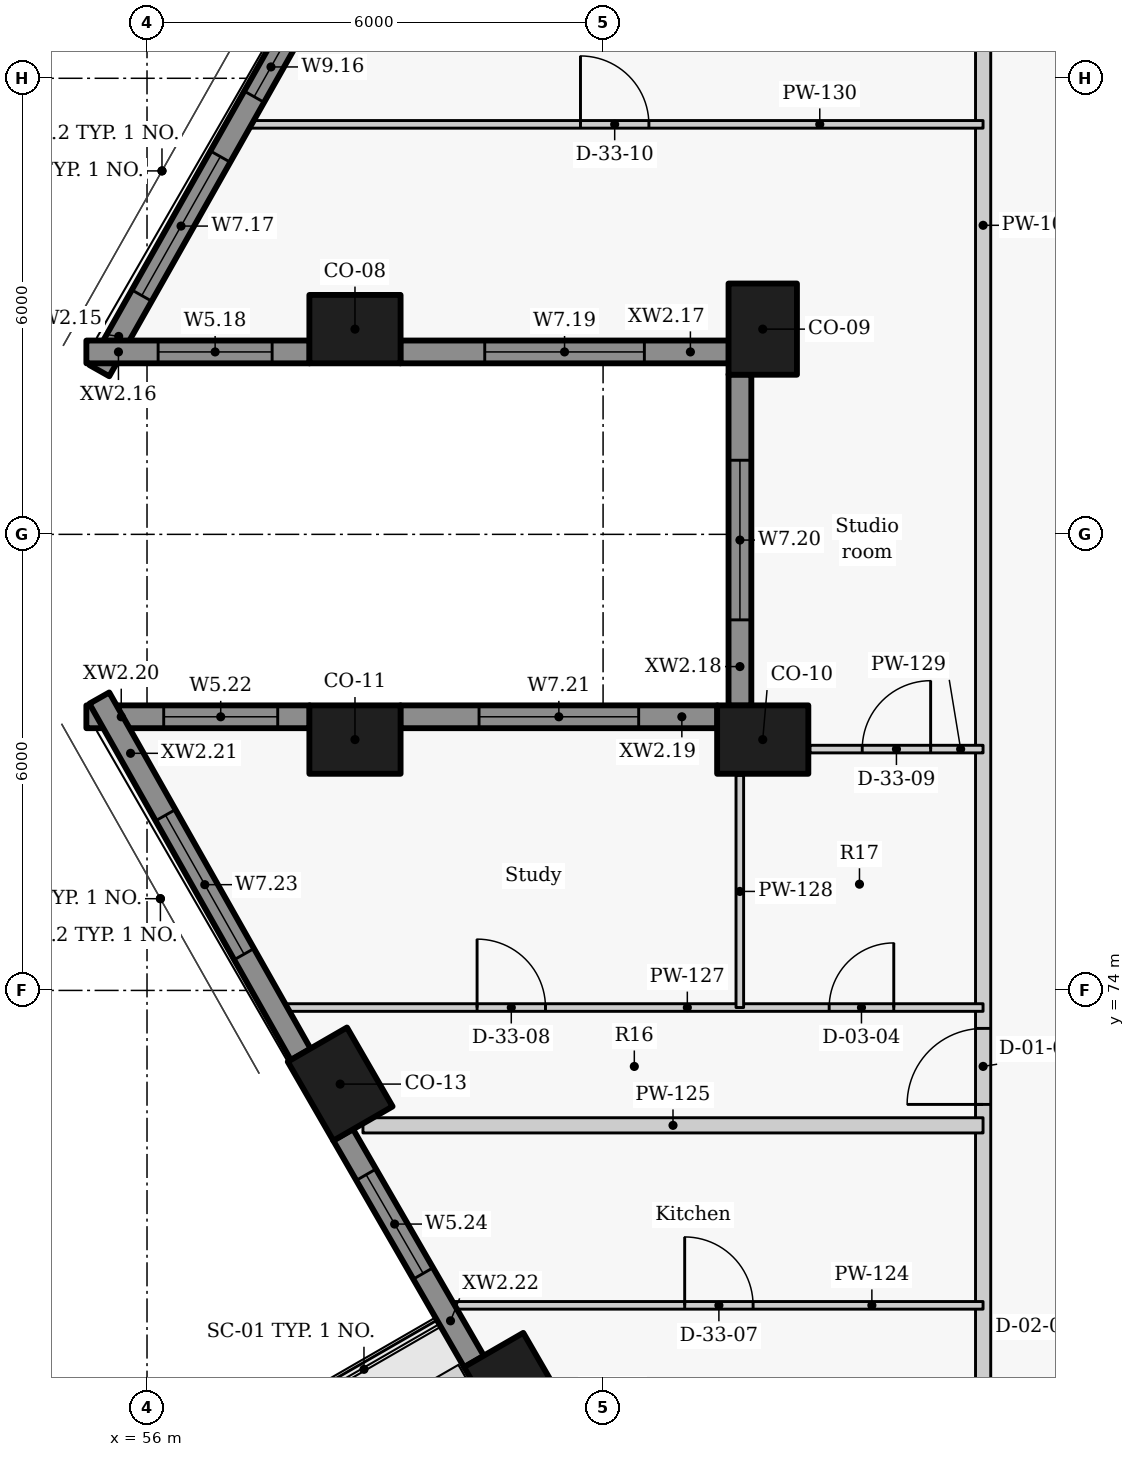
"""IFC4 building model, lengths in metres.
Left out: names, types, materials, properties, quantities, classifications, styles, units other than length and angle.
Written with IfcOpenShell. Run it as: python <this file> out.ifc"""

import sys

from ifc_helpers import new_model, si_unit, direction, frame, frame_2d, origin, origin_2d, place, context, subcontext, project, spatial, rectangle, extrude, element, fill, save


model = new_model("IFC4")
c1 = context("Model", 3, precision=1e-05, world=origin(), true_north=direction((0.0, 1.0)))
c2 = subcontext(c1, "Body", "Model", "MODEL_VIEW")
j1 = project(units=[si_unit("LENGTHUNIT", "METRE"), si_unit("PLANEANGLEUNIT", "RADIAN")], contexts=[c1])
p1 = place(None, origin())
s1 = spatial("IfcSite", under=j1, at=p1, CompositionType="ELEMENT")
p2 = place(p1, origin())
s2 = spatial("IfcBuilding", under=s1, at=p2, CompositionType="ELEMENT")
p3 = place(p2, frame((0.0, 0.0, 183.3)))
s3 = spatial("IfcBuildingStorey", under=s2, at=p3, CompositionType="ELEMENT", Elevation=183.3)
for number, where, z_axis, x_axis in (
    (1, (58.736, 82.7, 0.0), (0.0, 0.0, 1.0), (1.0, 0.0, 0.0)),
    (2, (64.101, 82.7, 0.0), (0.0, 0.0, 1.0), (0.0, -1.0, 0.0)),
    (3, (64.101, 77.3, 0.0), (0.0, 0.0, 1.0), (-1.0, 0.0, 0.0)),
    (4, (58.736, 77.3, 0.0), (0.0, 0.0, 1.0), (-1.0, 0.0, 0.0)),
    (5, (58.541, 72.768, 0.0), (0.0, 0.0, 1.0), (0.5, -0.866, 0.0)),
    (6, (60.861, 68.75, 0.0), (0.0, 0.0, 1.0), (0.5, -0.866, 0.0)),
):
    element("IfcColumn", number, at=place(p3, frame(where, z_axis=z_axis, x_axis=x_axis)), inside=s3, PredefinedType="COLUMN", context=c2, shape_type="SweptSolid", body=[
        extrude(rectangle(XDim=1.2, YDim=0.9, at=origin_2d()), origin(), (0.0, 0.0, 1.0), 3.3),
    ])
p4 = place(p3, frame((58.023, 86.843, 0.0), z_axis=(0.0, 0.0, 1.0), x_axis=(-0.492033360928, -0.870576344575, 0.0)))
e7 = element("IfcWall", 7, at=p4, inside=s3, PredefinedType="SOLIDWALL", context=c2, shape_type="SweptSolid", body=[
    extrude(rectangle(XDim=5.387, YDim=0.3, at=frame_2d((2.693, 0.0))), origin(), (0.0, 0.0, 1.0), 2.425),
])
p5 = place(p4, frame((0.347, 0.0, 0.9)))
e8 = element("IfcOpeningElement", 8, at=p5, cuts=e7, PredefinedType="OPENING", context=c2, shape_type="SweptSolid", body=[
    extrude(rectangle(XDim=0.9, YDim=1.1, at=frame_2d((0.45, 0.55))), frame((0.0, 0.16, 0.0), z_axis=(0.0, -1.0, 0.0), x_axis=(1.0, 0.0, 0.0)), (0.0, 0.0, 1.0), 0.32),
])
p6 = place(p4, frame((2.152, 0.0, 0.9)))
e9 = element("IfcOpeningElement", 9, at=p6, cuts=e7, PredefinedType="OPENING", context=c2, shape_type="SweptSolid", body=[
    extrude(rectangle(XDim=2.1, YDim=1.1, at=frame_2d((1.05, 0.55))), frame((0.0, 0.16, 0.0), z_axis=(0.0, -1.0, 0.0), x_axis=(1.0, 0.0, 0.0)), (0.0, 0.0, 1.0), 0.32),
])
p7 = place(p3, frame((55.202, 82.4, 0.0), z_axis=(0.0, 0.0, 1.0), x_axis=(1.0, 0.0, 0.0)))
e10 = element("IfcWall", 10, at=p7, inside=s3, PredefinedType="SOLIDWALL", context=c2, shape_type="SweptSolid", body=[
    extrude(rectangle(XDim=2.938, YDim=0.3, at=frame_2d((1.469, 0.0))), origin(), (0.0, 0.0, 1.0), 2.425),
])
p8 = place(p7, frame((0.944, 0.0, 0.9)))
e11 = element("IfcOpeningElement", 11, at=p8, cuts=e10, PredefinedType="OPENING", context=c2, shape_type="SweptSolid", body=[
    extrude(rectangle(XDim=1.5, YDim=1.1, at=frame_2d((0.75, 0.55))), frame((0.0, 0.16, 0.0), z_axis=(0.0, -1.0, 0.0), x_axis=(1.0, 0.0, 0.0)), (0.0, 0.0, 1.0), 0.32),
])
p9 = place(p3, frame((59.332, 82.4, 0.0), z_axis=(0.0, 0.0, 1.0), x_axis=(1.0, 0.0, 0.0)))
e12 = element("IfcWall", 12, at=p9, inside=s3, PredefinedType="SOLIDWALL", context=c2, shape_type="SweptSolid", body=[
    extrude(rectangle(XDim=4.323, YDim=0.3, at=frame_2d((2.161, 0.0))), origin(), (0.0, 0.0, 1.0), 2.425),
])
p10 = place(p9, frame((1.111, 0.0, 0.9)))
e13 = element("IfcOpeningElement", 13, at=p10, cuts=e12, PredefinedType="OPENING", context=c2, shape_type="SweptSolid", body=[
    extrude(rectangle(XDim=2.1, YDim=1.1, at=frame_2d((1.05, 0.55))), frame((0.0, 0.16, 0.0), z_axis=(0.0, -1.0, 0.0), x_axis=(1.0, 0.0, 0.0)), (0.0, 0.0, 1.0), 0.32),
])
p11 = place(p3, frame((63.801, 82.104, 0.0), z_axis=(0.0, 0.0, 1.0), x_axis=(0.0, -1.0, 0.0)))
e14 = element("IfcWall", 14, at=p11, inside=s3, PredefinedType="SOLIDWALL", context=c2, shape_type="SweptSolid", body=[
    extrude(rectangle(XDim=4.358, YDim=0.3, at=frame_2d((2.179, 0.0))), origin(), (0.0, 0.0, 1.0), 2.425),
])
p12 = place(p11, frame((1.129, 0.0, 0.9)))
e15 = element("IfcOpeningElement", 15, at=p12, cuts=e14, PredefinedType="OPENING", context=c2, shape_type="SweptSolid", body=[
    extrude(rectangle(XDim=2.1, YDim=1.1, at=frame_2d((1.05, 0.55))), frame((0.0, 0.16, 0.0), z_axis=(0.0, -1.0, 0.0), x_axis=(1.0, 0.0, 0.0)), (0.0, 0.0, 1.0), 0.32),
])
p13 = place(p3, frame((63.504, 77.6, 0.0), z_axis=(0.0, 0.0, 1.0), x_axis=(-1.0, 0.0, 0.0)))
e16 = element("IfcWall", 16, at=p13, inside=s3, PredefinedType="SOLIDWALL", context=c2, shape_type="SweptSolid", body=[
    extrude(rectangle(XDim=4.172, YDim=0.3, at=frame_2d((2.086, 0.0))), origin(), (0.0, 0.0, 1.0), 2.425),
])
p14 = place(p13, frame((1.036, 0.0, 0.9)))
e17 = element("IfcOpeningElement", 17, at=p14, cuts=e16, PredefinedType="OPENING", context=c2, shape_type="SweptSolid", body=[
    extrude(rectangle(XDim=2.1, YDim=1.1, at=frame_2d((1.05, 0.55))), frame((0.0, 0.16, 0.0), z_axis=(0.0, -1.0, 0.0), x_axis=(1.0, 0.0, 0.0)), (0.0, 0.0, 1.0), 0.32),
])
p15 = place(p3, frame((58.14, 77.6, 0.0), z_axis=(0.0, 0.0, 1.0), x_axis=(-1.0, 0.0, 0.0)))
e18 = element("IfcWall", 18, at=p15, inside=s3, PredefinedType="SOLIDWALL", context=c2, shape_type="SweptSolid", body=[
    extrude(rectangle(XDim=2.938, YDim=0.3, at=frame_2d((1.469, 0.0))), origin(), (0.0, 0.0, 1.0), 2.425),
])
p16 = place(p15, frame((0.42, 0.0, 0.9)))
e19 = element("IfcOpeningElement", 19, at=p16, cuts=e18, PredefinedType="OPENING", context=c2, shape_type="SweptSolid", body=[
    extrude(rectangle(XDim=1.5, YDim=1.1, at=frame_2d((0.75, 0.55))), frame((0.0, 0.16, 0.0), z_axis=(0.0, -1.0, 0.0), x_axis=(1.0, 0.0, 0.0)), (0.0, 0.0, 1.0), 0.32),
])
p17 = place(p3, frame((55.373, 77.846, 0.0), z_axis=(0.0, 0.0, 1.0), x_axis=(0.492033360928, -0.870576344575, 0.0)))
e20 = element("IfcWall", 20, at=p17, inside=s3, PredefinedType="SOLIDWALL", context=c2, shape_type="SweptSolid", body=[
    extrude(rectangle(XDim=5.387, YDim=0.3, at=frame_2d((2.693, 0.0))), origin(), (0.0, 0.0, 1.0), 2.425),
])
p18 = place(p17, frame((1.77, 0.0, 0.9)))
e21 = element("IfcOpeningElement", 21, at=p18, cuts=e20, PredefinedType="OPENING", context=c2, shape_type="SweptSolid", body=[
    extrude(rectangle(XDim=2.1, YDim=1.1, at=frame_2d((1.05, 0.55))), frame((0.0, 0.16, 0.0), z_axis=(0.0, -1.0, 0.0), x_axis=(1.0, 0.0, 0.0)), (0.0, 0.0, 1.0), 0.32),
])
p19 = place(p3, frame((58.579, 72.102, 0.0), z_axis=(0.0, 0.0, 1.0), x_axis=(0.499955427682, -0.866051136095, 0.0)))
e22 = element("IfcWall", 22, at=p19, inside=s3, PredefinedType="SOLIDWALL", context=c2, shape_type="SweptSolid", body=[
    extrude(rectangle(XDim=3.447, YDim=0.3, at=frame_2d((1.724, 0.0))), origin(), (0.0, 0.0, 1.0), 2.425),
])
p20 = place(p19, frame((0.607, 0.0, 0.9)))
e23 = element("IfcOpeningElement", 23, at=p20, cuts=e22, PredefinedType="OPENING", context=c2, shape_type="SweptSolid", body=[
    extrude(rectangle(XDim=1.5, YDim=1.1, at=frame_2d((0.75, 0.55))), frame((0.0, 0.16, 0.0), z_axis=(0.0, -1.0, 0.0), x_axis=(1.0, 0.0, 0.0)), (0.0, 0.0, 1.0), 0.32),
])
p21 = place(p3, frame((67.0, 58.674, 0.0), z_axis=(0.0, 0.0, 1.0), x_axis=(0.0, 1.0, 0.0)))
e24 = element("IfcWall", 24, at=p21, inside=s3, PredefinedType="PARTITIONING", context=c2, shape_type="SweptSolid", body=[
    extrude(rectangle(XDim=42.592, YDim=0.2, at=frame_2d((21.296, 0.0))), origin(), (0.0, 0.0, 1.0), 2.405),
])
p22 = place(p21, frame((2.376, 0.0, 0.0)))
e25 = element("IfcOpeningElement", 25, at=p22, cuts=e24, PredefinedType="OPENING", context=c2, shape_type="SweptSolid", body=[
    extrude(rectangle(XDim=1.0, YDim=2.1, at=frame_2d((0.5, 1.05))), frame((0.0, 0.11, 0.0), z_axis=(0.0, -1.0, 0.0), x_axis=(1.0, 0.0, 0.0)), (0.0, 0.0, 1.0), 0.22),
])
p23 = place(p21, frame((13.826, 0.0, 0.0)))
e26 = element("IfcOpeningElement", 26, at=p23, cuts=e24, PredefinedType="OPENING", context=c2, shape_type="SweptSolid", body=[
    extrude(rectangle(XDim=1.0, YDim=2.1, at=frame_2d((0.5, 1.05))), frame((0.0, 0.11, 0.0), z_axis=(0.0, -1.0, 0.0), x_axis=(1.0, 0.0, 0.0)), (0.0, 0.0, 1.0), 0.22),
])
p24 = place(p21, frame((35.957, 0.0, 0.0)))
e27 = element("IfcOpeningElement", 27, at=p24, cuts=e24, PredefinedType="OPENING", context=c2, shape_type="SweptSolid", body=[
    extrude(rectangle(XDim=1.0, YDim=2.1, at=frame_2d((0.5, 1.05))), frame((0.0, 0.11, 0.0), z_axis=(0.0, -1.0, 0.0), x_axis=(1.0, 0.0, 0.0)), (0.0, 0.0, 1.0), 0.22),
])
p25 = place(p3, frame((60.049, 69.857, 0.0), z_axis=(0.0, 0.0, 1.0), x_axis=(1.0, 0.0, 0.0)))
e28 = element("IfcWall", 28, at=p25, inside=s3, PredefinedType="PARTITIONING", context=c2, shape_type="SweptSolid", body=[
    extrude(rectangle(XDim=6.95, YDim=0.1, at=frame_2d((3.475, 0.0))), origin(), (0.0, 0.0, 1.0), 2.405),
])
p26 = place(p25, frame((3.025, 0.0, 0.0)))
e29 = element("IfcOpeningElement", 29, at=p26, cuts=e28, PredefinedType="OPENING", context=c2, shape_type="SweptSolid", body=[
    extrude(rectangle(XDim=0.9, YDim=2.1, at=frame_2d((0.45, 1.05))), frame((0.0, 0.06, 0.0), z_axis=(0.0, -1.0, 0.0), x_axis=(1.0, 0.0, 0.0)), (0.0, 0.0, 1.0), 0.12),
])
p27 = place(p3, frame((58.841, 72.225, 0.0), z_axis=(0.0, 0.0, 1.0), x_axis=(1.0, 0.0, 0.0)))
e30 = element("IfcWall", 30, at=p27, inside=s3, PredefinedType="PARTITIONING", context=c2, shape_type="SweptSolid", body=[
    extrude(rectangle(XDim=8.158, YDim=0.2, at=frame_2d((4.079, 0.0))), origin(), (0.0, 0.0, 1.0), 3.025),
])
p28 = place(p3, frame((57.786, 73.775, 0.0), z_axis=(0.0, 0.0, 1.0), x_axis=(1.0, 0.0, 0.0)))
e31 = element("IfcWall", 31, at=p28, inside=s3, PredefinedType="PARTITIONING", context=c2, shape_type="SweptSolid", body=[
    extrude(rectangle(XDim=9.213, YDim=0.1, at=frame_2d((4.606, 0.0))), origin(), (0.0, 0.0, 1.0), 2.405),
])
p29 = place(p28, frame((7.188, 0.0, 0.0)))
e32 = element("IfcOpeningElement", 32, at=p29, cuts=e31, PredefinedType="OPENING", context=c2, shape_type="SweptSolid", body=[
    extrude(rectangle(XDim=0.85, YDim=2.1, at=frame_2d((0.425, 1.05))), frame((0.0, 0.06, 0.0), z_axis=(0.0, -1.0, 0.0), x_axis=(1.0, 0.0, 0.0)), (0.0, 0.0, 1.0), 0.12),
])
p30 = place(p28, frame((2.556, 0.0, 0.0)))
e33 = element("IfcOpeningElement", 33, at=p30, cuts=e31, PredefinedType="OPENING", context=c2, shape_type="SweptSolid", body=[
    extrude(rectangle(XDim=0.9, YDim=2.1, at=frame_2d((0.45, 1.05))), frame((0.0, 0.06, 0.0), z_axis=(0.0, -1.0, 0.0), x_axis=(1.0, 0.0, 0.0)), (0.0, 0.0, 1.0), 0.12),
])
p31 = place(p3, frame((63.799, 73.775, 0.0), z_axis=(0.0, 0.0, 1.0), x_axis=(0.0, 1.0, 0.0)))
e34 = element("IfcWall", 34, at=p31, inside=s3, PredefinedType="PARTITIONING", context=c2, shape_type="SweptSolid", body=[
    extrude(rectangle(XDim=3.055, YDim=0.1, at=frame_2d((1.528, 0.0))), origin(), (0.0, 0.0, 1.0), 3.025),
])
p32 = place(p3, frame((64.72, 77.175, 0.0), z_axis=(0.0, 0.0, 1.0), x_axis=(1.0, 0.0, 0.0)))
e35 = element("IfcWall", 35, at=p32, inside=s3, PredefinedType="PARTITIONING", context=c2, shape_type="SweptSolid", body=[
    extrude(rectangle(XDim=2.279, YDim=0.1, at=frame_2d((1.139, 0.0))), origin(), (0.0, 0.0, 1.0), 3.025),
])
p33 = place(p32, frame((0.689, 0.0, 0.0)))
e36 = element("IfcOpeningElement", 36, at=p33, cuts=e35, PredefinedType="OPENING", context=c2, shape_type="SweptSolid", body=[
    extrude(rectangle(XDim=0.9, YDim=2.1, at=frame_2d((0.45, 1.05))), frame((0.0, 0.06, 0.0), z_axis=(0.0, -1.0, 0.0), x_axis=(1.0, 0.0, 0.0)), (0.0, 0.0, 1.0), 0.12),
])
p34 = place(p3, frame((57.307, 85.394, 0.0), z_axis=(0.0, 0.0, 1.0), x_axis=(1.0, 0.0, 0.0)))
e37 = element("IfcWall", 37, at=p34, inside=s3, PredefinedType="PARTITIONING", context=c2, shape_type="SweptSolid", body=[
    extrude(rectangle(XDim=9.692, YDim=0.1, at=frame_2d((4.846, 0.0))), origin(), (0.0, 0.0, 1.0), 2.405),
])
p35 = place(p34, frame((4.396, 0.0, 0.0)))
e38 = element("IfcOpeningElement", 38, at=p35, cuts=e37, PredefinedType="OPENING", context=c2, shape_type="SweptSolid", body=[
    extrude(rectangle(XDim=0.9, YDim=2.1, at=frame_2d((0.45, 1.05))), frame((0.0, 0.06, 0.0), z_axis=(0.0, -1.0, 0.0), x_axis=(1.0, 0.0, 0.0)), (0.0, 0.0, 1.0), 0.12),
])
p36 = place(p5, origin())
e39 = element("IfcWindow", 39, at=p36, inside=s3, PartitioningType="SINGLE_PANEL", PredefinedType="WINDOW", context=c2, shape_type="SweptSolid", body=[
    extrude(rectangle(XDim=0.9, YDim=1.1, at=frame_2d((0.45, 0.55))), frame((0.0, 0.03, 0.0), z_axis=(0.0, -1.0, 0.0), x_axis=(1.0, 0.0, 0.0)), (0.0, 0.0, 1.0), 0.06),
])
fill(e8, e39)
p37 = place(p6, origin())
e40 = element("IfcWindow", 40, at=p37, inside=s3, PartitioningType="SINGLE_PANEL", PredefinedType="WINDOW", context=c2, shape_type="SweptSolid", body=[
    extrude(rectangle(XDim=2.1, YDim=1.1, at=frame_2d((1.05, 0.55))), frame((0.0, 0.03, 0.0), z_axis=(0.0, -1.0, 0.0), x_axis=(1.0, 0.0, 0.0)), (0.0, 0.0, 1.0), 0.06),
])
fill(e9, e40)
p38 = place(p8, origin())
e41 = element("IfcWindow", 41, at=p38, inside=s3, PartitioningType="SINGLE_PANEL", PredefinedType="WINDOW", context=c2, shape_type="SweptSolid", body=[
    extrude(rectangle(XDim=1.5, YDim=1.1, at=frame_2d((0.75, 0.55))), frame((0.0, 0.03, 0.0), z_axis=(0.0, -1.0, 0.0), x_axis=(1.0, 0.0, 0.0)), (0.0, 0.0, 1.0), 0.06),
])
fill(e11, e41)
p39 = place(p10, origin())
e42 = element("IfcWindow", 42, at=p39, inside=s3, PartitioningType="SINGLE_PANEL", PredefinedType="WINDOW", context=c2, shape_type="SweptSolid", body=[
    extrude(rectangle(XDim=2.1, YDim=1.1, at=frame_2d((1.05, 0.55))), frame((0.0, 0.03, 0.0), z_axis=(0.0, -1.0, 0.0), x_axis=(1.0, 0.0, 0.0)), (0.0, 0.0, 1.0), 0.06),
])
fill(e13, e42)
p40 = place(p12, origin())
e43 = element("IfcWindow", 43, at=p40, inside=s3, PartitioningType="SINGLE_PANEL", PredefinedType="WINDOW", context=c2, shape_type="SweptSolid", body=[
    extrude(rectangle(XDim=2.1, YDim=1.1, at=frame_2d((1.05, 0.55))), frame((0.0, 0.03, 0.0), z_axis=(0.0, -1.0, 0.0), x_axis=(1.0, 0.0, 0.0)), (0.0, 0.0, 1.0), 0.06),
])
fill(e15, e43)
p41 = place(p14, origin())
e44 = element("IfcWindow", 44, at=p41, inside=s3, PartitioningType="SINGLE_PANEL", PredefinedType="WINDOW", context=c2, shape_type="SweptSolid", body=[
    extrude(rectangle(XDim=2.1, YDim=1.1, at=frame_2d((1.05, 0.55))), frame((0.0, 0.03, 0.0), z_axis=(0.0, -1.0, 0.0), x_axis=(1.0, 0.0, 0.0)), (0.0, 0.0, 1.0), 0.06),
])
fill(e17, e44)
p42 = place(p16, origin())
e45 = element("IfcWindow", 45, at=p42, inside=s3, PartitioningType="SINGLE_PANEL", PredefinedType="WINDOW", context=c2, shape_type="SweptSolid", body=[
    extrude(rectangle(XDim=1.5, YDim=1.1, at=frame_2d((0.75, 0.55))), frame((0.0, 0.03, 0.0), z_axis=(0.0, -1.0, 0.0), x_axis=(1.0, 0.0, 0.0)), (0.0, 0.0, 1.0), 0.06),
])
fill(e19, e45)
p43 = place(p18, origin())
e46 = element("IfcWindow", 46, at=p43, inside=s3, PartitioningType="SINGLE_PANEL", PredefinedType="WINDOW", context=c2, shape_type="SweptSolid", body=[
    extrude(rectangle(XDim=2.1, YDim=1.1, at=frame_2d((1.05, 0.55))), frame((0.0, 0.03, 0.0), z_axis=(0.0, -1.0, 0.0), x_axis=(1.0, 0.0, 0.0)), (0.0, 0.0, 1.0), 0.06),
])
fill(e21, e46)
p44 = place(p20, origin())
e47 = element("IfcWindow", 47, at=p44, inside=s3, PartitioningType="SINGLE_PANEL", PredefinedType="WINDOW", context=c2, shape_type="SweptSolid", body=[
    extrude(rectangle(XDim=1.5, YDim=1.1, at=frame_2d((0.75, 0.55))), frame((0.0, 0.03, 0.0), z_axis=(0.0, -1.0, 0.0), x_axis=(1.0, 0.0, 0.0)), (0.0, 0.0, 1.0), 0.06),
])
fill(e23, e47)
p45 = place(p26, origin())
e48 = element("IfcDoor", 48, at=p45, inside=s3, OperationType="SINGLE_SWING_LEFT", PredefinedType="DOOR", context=c2, shape_type="SweptSolid", body=[
    extrude(rectangle(XDim=0.9, YDim=2.1, at=frame_2d((0.45, 1.05))), frame((0.0, 0.025, 0.0), z_axis=(0.0, -1.0, 0.0), x_axis=(1.0, 0.0, 0.0)), (0.0, 0.0, 1.0), 0.05),
])
fill(e29, e48)
p46 = place(p23, origin())
e49 = element("IfcDoor", 49, at=p46, inside=s3, OperationType="SINGLE_SWING_LEFT", PredefinedType="DOOR", context=c2, shape_type="SweptSolid", body=[
    extrude(rectangle(XDim=1.0, YDim=2.1, at=frame_2d((0.5, 1.05))), frame((0.0, 0.025, 0.0), z_axis=(0.0, -1.0, 0.0), x_axis=(1.0, 0.0, 0.0)), (0.0, 0.0, 1.0), 0.05),
])
fill(e26, e49)
p47 = place(p29, origin())
e50 = element("IfcDoor", 50, at=p47, inside=s3, OperationType="SINGLE_SWING_RIGHT", PredefinedType="DOOR", context=c2, shape_type="SweptSolid", body=[
    extrude(rectangle(XDim=0.85, YDim=2.1, at=frame_2d((0.425, 1.05))), frame((0.0, 0.025, 0.0), z_axis=(0.0, -1.0, 0.0), x_axis=(1.0, 0.0, 0.0)), (0.0, 0.0, 1.0), 0.05),
])
fill(e32, e50)
p48 = place(p30, origin())
e51 = element("IfcDoor", 51, at=p48, inside=s3, OperationType="SINGLE_SWING_LEFT", PredefinedType="DOOR", context=c2, shape_type="SweptSolid", body=[
    extrude(rectangle(XDim=0.9, YDim=2.1, at=frame_2d((0.45, 1.05))), frame((0.0, 0.025, 0.0), z_axis=(0.0, -1.0, 0.0), x_axis=(1.0, 0.0, 0.0)), (0.0, 0.0, 1.0), 0.05),
])
fill(e33, e51)
p49 = place(p33, origin())
e52 = element("IfcDoor", 52, at=p49, inside=s3, OperationType="SINGLE_SWING_RIGHT", PredefinedType="DOOR", context=c2, shape_type="SweptSolid", body=[
    extrude(rectangle(XDim=0.9, YDim=2.1, at=frame_2d((0.45, 1.05))), frame((0.0, 0.025, 0.0), z_axis=(0.0, -1.0, 0.0), x_axis=(1.0, 0.0, 0.0)), (0.0, 0.0, 1.0), 0.05),
])
fill(e36, e52)
p50 = place(p35, origin())
e53 = element("IfcDoor", 53, at=p50, inside=s3, OperationType="SINGLE_SWING_LEFT", PredefinedType="DOOR", context=c2, shape_type="SweptSolid", body=[
    extrude(rectangle(XDim=0.9, YDim=2.1, at=frame_2d((0.45, 1.05))), frame((0.0, 0.025, 0.0), z_axis=(0.0, -1.0, 0.0), x_axis=(1.0, 0.0, 0.0)), (0.0, 0.0, 1.0), 0.05),
])
fill(e38, e53)
save(model, sys.argv[1])
